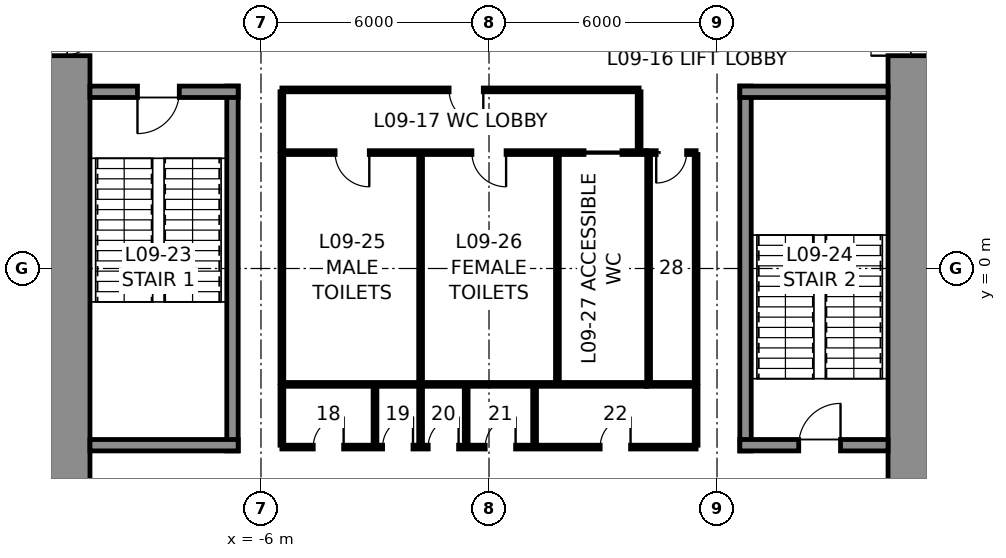
"""IFC4 building model, lengths in metres.
Left out: names, types, materials, properties, quantities, classifications, styles, units other than length and angle.
Written with IfcOpenShell. Run it as: python <this file> out.ifc"""

import sys

from ifc_helpers import new_model, si_unit, direction, frame, frame_2d, origin, place, context, subcontext, project, spatial, rectangle, extrude, element, fill, save


model = new_model("IFC4")
c1 = context("Model", 3, precision=1e-05, world=origin(), true_north=direction((0.0, 1.0)))
c2 = subcontext(c1, "Body", "Model", "MODEL_VIEW")
j1 = project(units=[si_unit("LENGTHUNIT", "METRE"), si_unit("PLANEANGLEUNIT", "RADIAN")], contexts=[c1])
p1 = place(None, origin())
s1 = spatial("IfcSite", under=j1, at=p1, CompositionType="ELEMENT")
p2 = place(p1, origin())
s2 = spatial("IfcBuilding", under=s1, at=p2, CompositionType="ELEMENT")
p3 = place(p2, frame((0.0, 0.0, 48.5)))
s3 = spatial("IfcBuildingStorey", under=s2, at=p3, CompositionType="ELEMENT", Elevation=48.5)
p4 = place(p3, frame((11.25, 10.5, 0.0), z_axis=(0.0, 0.0, 1.0), x_axis=(0.0, -1.0, 0.0)))
e1 = element("IfcWall", 1, at=p4, inside=s3, PredefinedType="SHEAR", context=c2, shape_type="SweptSolid", body=[
    extrude(rectangle(XDim=21.0, YDim=1.5, at=frame_2d((10.5, 0.0))), origin(), (0.0, 0.0, 1.0), 5.5),
])
p5 = place(p4, frame((3.7, 0.0, 0.0)))
e2 = element("IfcOpeningElement", 2, at=p5, cuts=e1, PredefinedType="OPENING", context=c2, shape_type="SweptSolid", body=[
    extrude(rectangle(XDim=1.2, YDim=2.3, at=frame_2d((0.6, 1.15))), frame((0.0, 0.76, 0.0), z_axis=(0.0, -1.0, 0.0), x_axis=(1.0, 0.0, 0.0)), (0.0, 0.0, 1.0), 1.52),
])
p6 = place(p4, frame((16.1, 0.0, 0.0)))
e3 = element("IfcOpeningElement", 3, at=p6, cuts=e1, PredefinedType="OPENING", context=c2, shape_type="SweptSolid", body=[
    extrude(rectangle(XDim=1.2, YDim=2.3, at=frame_2d((0.6, 1.15))), frame((0.0, 0.76, 0.0), z_axis=(0.0, -1.0, 0.0), x_axis=(1.0, 0.0, 0.0)), (0.0, 0.0, 1.0), 1.52),
])
p7 = place(p3, frame((-11.25, -10.5, 0.0), z_axis=(0.0, 0.0, 1.0), x_axis=(0.0, 1.0, 0.0)))
e4 = element("IfcWall", 4, at=p7, inside=s3, PredefinedType="SHEAR", context=c2, shape_type="SweptSolid", body=[
    extrude(rectangle(XDim=21.0, YDim=1.5, at=frame_2d((10.5, 0.0))), origin(), (0.0, 0.0, 1.0), 5.5),
])
p8 = place(p7, frame((16.1, 0.0, 0.0)))
e5 = element("IfcOpeningElement", 5, at=p8, cuts=e4, PredefinedType="OPENING", context=c2, shape_type="SweptSolid", body=[
    extrude(rectangle(XDim=1.2, YDim=2.3, at=frame_2d((0.6, 1.15))), frame((0.0, 0.76, 0.0), z_axis=(0.0, -1.0, 0.0), x_axis=(1.0, 0.0, 0.0)), (0.0, 0.0, 1.0), 1.52),
])
p9 = place(p7, frame((3.7, 0.0, 0.0)))
e6 = element("IfcOpeningElement", 6, at=p9, cuts=e4, PredefinedType="OPENING", context=c2, shape_type="SweptSolid", body=[
    extrude(rectangle(XDim=1.2, YDim=2.3, at=frame_2d((0.6, 1.15))), frame((0.0, 0.76, 0.0), z_axis=(0.0, -1.0, 0.0), x_axis=(1.0, 0.0, 0.0)), (0.0, 0.0, 1.0), 1.52),
])
p10 = place(p3, frame((-6.75, -4.8, 0.0), z_axis=(0.0, 0.0, 1.0), x_axis=(0.0, 1.0, 0.0)))
e7 = element("IfcWall", 7, at=p10, inside=s3, PredefinedType="SOLIDWALL", context=c2, shape_type="SweptSolid", body=[
    extrude(rectangle(XDim=9.6, YDim=0.3, at=frame_2d((4.8, 0.0))), origin(), (0.0, 0.0, 1.0), 5.25),
])
p11 = place(p3, frame((-10.5, 4.65, 0.0), z_axis=(0.0, 0.0, 1.0), x_axis=(1.0, 0.0, 0.0)))
e8 = element("IfcWall", 8, at=p11, inside=s3, PredefinedType="SOLIDWALL", context=c2, shape_type="SweptSolid", body=[
    extrude(rectangle(XDim=3.9, YDim=0.3, at=frame_2d((1.95, 0.0))), origin(), (0.0, 0.0, 1.0), 5.25),
])
p12 = place(p11, frame((1.25, 0.0, 0.0)))
e9 = element("IfcOpeningElement", 9, at=p12, cuts=e8, PredefinedType="OPENING", context=c2, shape_type="SweptSolid", body=[
    extrude(rectangle(XDim=1.1, YDim=2.3, at=frame_2d((0.55, 1.15))), frame((0.0, 0.16, 0.0), z_axis=(0.0, -1.0, 0.0), x_axis=(1.0, 0.0, 0.0)), (0.0, 0.0, 1.0), 0.32),
])
p13 = place(p3, frame((-6.6, -4.65, 0.0), z_axis=(0.0, 0.0, 1.0), x_axis=(-1.0, 0.0, 0.0)))
e10 = element("IfcWall", 10, at=p13, inside=s3, PredefinedType="SOLIDWALL", context=c2, shape_type="SweptSolid", body=[
    extrude(rectangle(XDim=3.9, YDim=0.3, at=frame_2d((1.95, 0.0))), origin(), (0.0, 0.0, 1.0), 5.25),
])
p14 = place(p3, frame((6.75, -4.8, 0.0), z_axis=(0.0, 0.0, 1.0), x_axis=(0.0, 1.0, 0.0)))
e11 = element("IfcWall", 11, at=p14, inside=s3, PredefinedType="SOLIDWALL", context=c2, shape_type="SweptSolid", body=[
    extrude(rectangle(XDim=9.6, YDim=0.3, at=frame_2d((4.8, 0.0))), origin(), (0.0, 0.0, 1.0), 5.25),
])
p15 = place(p3, frame((6.6, 4.65, 0.0), z_axis=(0.0, 0.0, 1.0), x_axis=(1.0, 0.0, 0.0)))
e12 = element("IfcWall", 12, at=p15, inside=s3, PredefinedType="SOLIDWALL", context=c2, shape_type="SweptSolid", body=[
    extrude(rectangle(XDim=3.9, YDim=0.3, at=frame_2d((1.95, 0.0))), origin(), (0.0, 0.0, 1.0), 5.25),
])
p16 = place(p3, frame((10.5, -4.65, 0.0), z_axis=(0.0, 0.0, 1.0), x_axis=(-1.0, 0.0, 0.0)))
e13 = element("IfcWall", 13, at=p16, inside=s3, PredefinedType="SOLIDWALL", context=c2, shape_type="SweptSolid", body=[
    extrude(rectangle(XDim=3.9, YDim=0.3, at=frame_2d((1.95, 0.0))), origin(), (0.0, 0.0, 1.0), 5.25),
])
p17 = place(p16, frame((1.25, 0.0, 0.0)))
e14 = element("IfcOpeningElement", 14, at=p17, cuts=e13, PredefinedType="OPENING", context=c2, shape_type="SweptSolid", body=[
    extrude(rectangle(XDim=1.1, YDim=2.3, at=frame_2d((0.55, 1.15))), frame((0.0, 0.16, 0.0), z_axis=(0.0, -1.0, 0.0), x_axis=(1.0, 0.0, 0.0)), (0.0, 0.0, 1.0), 0.32),
])
p18 = place(p3, frame((-5.45, 3.05, 0.0), z_axis=(0.0, 0.0, 1.0), x_axis=(1.0, 0.0, 0.0)))
e15 = element("IfcWall", 15, at=p18, inside=s3, PredefinedType="PARTITIONING", context=c2, shape_type="SweptSolid", body=[
    extrude(rectangle(XDim=9.6, YDim=0.1, at=frame_2d((4.8, 0.0))), origin(), (0.0, 0.0, 1.0), 5.25),
])
p19 = place(p18, frame((1.4, 0.0, 0.0)))
e16 = element("IfcOpeningElement", 16, at=p19, cuts=e15, PredefinedType="OPENING", context=c2, shape_type="SweptSolid", body=[
    extrude(rectangle(XDim=0.9, YDim=2.3, at=frame_2d((0.45, 1.15))), frame((0.0, 0.06, 0.0), z_axis=(0.0, -1.0, 0.0), x_axis=(1.0, 0.0, 0.0)), (0.0, 0.0, 1.0), 0.12),
])
p20 = place(p18, frame((5.0, 0.0, 0.0)))
e17 = element("IfcOpeningElement", 17, at=p20, cuts=e15, PredefinedType="OPENING", context=c2, shape_type="SweptSolid", body=[
    extrude(rectangle(XDim=0.9, YDim=2.3, at=frame_2d((0.45, 1.15))), frame((0.0, 0.06, 0.0), z_axis=(0.0, -1.0, 0.0), x_axis=(1.0, 0.0, 0.0)), (0.0, 0.0, 1.0), 0.12),
])
p21 = place(p18, frame((7.95, 0.0, 0.0)))
e18 = element("IfcOpeningElement", 18, at=p21, cuts=e15, PredefinedType="OPENING", context=c2, shape_type="SweptSolid", body=[
    extrude(rectangle(XDim=1.0, YDim=2.3, at=frame_2d((0.5, 1.15))), frame((0.0, 0.06, 0.0), z_axis=(0.0, -1.0, 0.0), x_axis=(1.0, 0.0, 0.0)), (0.0, 0.0, 1.0), 0.12),
])
p22 = place(p3, frame((4.15, 3.05, 0.0), z_axis=(0.0, 0.0, 1.0), x_axis=(1.0, 0.0, 0.0)))
e19 = element("IfcWall", 19, at=p22, inside=s3, PredefinedType="PARTITIONING", context=c2, shape_type="SweptSolid", body=[
    extrude(rectangle(XDim=1.3, YDim=0.1, at=frame_2d((0.65, 0.0))), origin(), (0.0, 0.0, 1.0), 5.25),
])
p23 = place(p22, frame((0.25, 0.0, 0.0)))
e20 = element("IfcOpeningElement", 20, at=p23, cuts=e19, PredefinedType="OPENING", context=c2, shape_type="SweptSolid", body=[
    extrude(rectangle(XDim=0.8, YDim=2.3, at=frame_2d((0.4, 1.15))), frame((0.0, 0.06, 0.0), z_axis=(0.0, -1.0, 0.0), x_axis=(1.0, 0.0, 0.0)), (0.0, 0.0, 1.0), 0.12),
])
p24 = place(p3, frame((4.15, -3.05, 0.0), z_axis=(0.0, 0.0, 1.0), x_axis=(-1.0, 0.0, 0.0)))
e21 = element("IfcWall", 21, at=p24, inside=s3, PredefinedType="PARTITIONING", context=c2, shape_type="SweptSolid", body=[
    extrude(rectangle(XDim=9.6, YDim=0.1, at=frame_2d((4.8, 0.0))), origin(), (0.0, 0.0, 1.0), 5.25),
])
p25 = place(p3, frame((5.45, -3.05, 0.0), z_axis=(0.0, 0.0, 1.0), x_axis=(-1.0, 0.0, 0.0)))
e22 = element("IfcWall", 22, at=p25, inside=s3, PredefinedType="PARTITIONING", context=c2, shape_type="SweptSolid", body=[
    extrude(rectangle(XDim=1.3, YDim=0.1, at=frame_2d((0.65, 0.0))), origin(), (0.0, 0.0, 1.0), 5.25),
])
for number, where, z_axis, x_axis in (
    (23, (5.45, 3.0, 0.0), (0.0, 0.0, 1.0), (0.0, -1.0, 0.0)),
    (24, (-5.45, -3.0, 0.0), (0.0, 0.0, 1.0), (0.0, 1.0, 0.0)),
    (25, (-1.8, -3.0, 0.0), (0.0, 0.0, 1.0), (0.0, 1.0, 0.0)),
    (26, (1.8, -3.0, 0.0), (0.0, 0.0, 1.0), (0.0, 1.0, 0.0)),
    (27, (4.2, -3.0, 0.0), (0.0, 0.0, 1.0), (0.0, 1.0, 0.0)),
):
    element("IfcWall", number, at=place(p3, frame(where, z_axis=z_axis, x_axis=x_axis)), inside=s3, PredefinedType="PARTITIONING", context=c2, shape_type="SweptSolid", body=[
        extrude(rectangle(XDim=6.0, YDim=0.1, at=frame_2d((3.0, 0.0))), origin(), (0.0, 0.0, 1.0), 5.25),
    ])
p26 = place(p3, frame((-5.45, 4.7, 0.0), z_axis=(0.0, 0.0, 1.0), x_axis=(1.0, 0.0, 0.0)))
e28 = element("IfcWall", 28, at=p26, inside=s3, PredefinedType="PARTITIONING", context=c2, shape_type="SweptSolid", body=[
    extrude(rectangle(XDim=9.4, YDim=0.1, at=frame_2d((4.7, 0.0))), origin(), (0.0, 0.0, 1.0), 5.25),
])
p27 = place(p26, frame((4.4, 0.0, 0.0)))
e29 = element("IfcOpeningElement", 29, at=p27, cuts=e28, PredefinedType="OPENING", context=c2, shape_type="SweptSolid", body=[
    extrude(rectangle(XDim=0.9, YDim=2.3, at=frame_2d((0.45, 1.15))), frame((0.0, 0.06, 0.0), z_axis=(0.0, -1.0, 0.0), x_axis=(1.0, 0.0, 0.0)), (0.0, 0.0, 1.0), 0.12),
])
for number, where, z_axis, x_axis in (
    (30, (-5.45, 3.1, 0.0), (0.0, 0.0, 1.0), (0.0, 1.0, 0.0)),
    (31, (3.95, 3.1, 0.0), (0.0, 0.0, 1.0), (0.0, 1.0, 0.0)),
):
    element("IfcWall", number, at=place(p3, frame(where, z_axis=z_axis, x_axis=x_axis)), inside=s3, PredefinedType="PARTITIONING", context=c2, shape_type="SweptSolid", body=[
        extrude(rectangle(XDim=1.55, YDim=0.1, at=frame_2d((0.775, 0.0))), origin(), (0.0, 0.0, 1.0), 5.25),
    ])
p28 = place(p3, frame((5.45, -4.7, 0.0), z_axis=(0.0, 0.0, 1.0), x_axis=(-1.0, 0.0, 0.0)))
e32 = element("IfcWall", 32, at=p28, inside=s3, PredefinedType="PARTITIONING", context=c2, shape_type="SweptSolid", body=[
    extrude(rectangle(XDim=10.9, YDim=0.1, at=frame_2d((5.45, 0.0))), origin(), (0.0, 0.0, 1.0), 5.25),
])
p29 = place(p28, frame((9.275, 0.0, 0.0)))
e33 = element("IfcOpeningElement", 33, at=p29, cuts=e32, PredefinedType="OPENING", context=c2, shape_type="SweptSolid", body=[
    extrude(rectangle(XDim=0.8, YDim=2.3, at=frame_2d((0.4, 1.15))), frame((0.0, 0.06, 0.0), z_axis=(0.0, -1.0, 0.0), x_axis=(1.0, 0.0, 0.0)), (0.0, 0.0, 1.0), 0.12),
])
p30 = place(p28, frame((7.45, 0.0, 0.0)))
e34 = element("IfcOpeningElement", 34, at=p30, cuts=e32, PredefinedType="OPENING", context=c2, shape_type="SweptSolid", body=[
    extrude(rectangle(XDim=0.8, YDim=2.3, at=frame_2d((0.4, 1.15))), frame((0.0, 0.06, 0.0), z_axis=(0.0, -1.0, 0.0), x_axis=(1.0, 0.0, 0.0)), (0.0, 0.0, 1.0), 0.12),
])
p31 = place(p28, frame((6.25, 0.0, 0.0)))
e35 = element("IfcOpeningElement", 35, at=p31, cuts=e32, PredefinedType="OPENING", context=c2, shape_type="SweptSolid", body=[
    extrude(rectangle(XDim=0.8, YDim=2.3, at=frame_2d((0.4, 1.15))), frame((0.0, 0.06, 0.0), z_axis=(0.0, -1.0, 0.0), x_axis=(1.0, 0.0, 0.0)), (0.0, 0.0, 1.0), 0.12),
])
p32 = place(p28, frame((4.75, 0.0, 0.0)))
e36 = element("IfcOpeningElement", 36, at=p32, cuts=e32, PredefinedType="OPENING", context=c2, shape_type="SweptSolid", body=[
    extrude(rectangle(XDim=0.8, YDim=2.3, at=frame_2d((0.4, 1.15))), frame((0.0, 0.06, 0.0), z_axis=(0.0, -1.0, 0.0), x_axis=(1.0, 0.0, 0.0)), (0.0, 0.0, 1.0), 0.12),
])
p33 = place(p28, frame((1.725, 0.0, 0.0)))
e37 = element("IfcOpeningElement", 37, at=p33, cuts=e32, PredefinedType="OPENING", context=c2, shape_type="SweptSolid", body=[
    extrude(rectangle(XDim=0.8, YDim=2.3, at=frame_2d((0.4, 1.15))), frame((0.0, 0.06, 0.0), z_axis=(0.0, -1.0, 0.0), x_axis=(1.0, 0.0, 0.0)), (0.0, 0.0, 1.0), 0.12),
])
for number, where, z_axis, x_axis in (
    (38, (-5.45, -3.1, 0.0), (0.0, 0.0, 1.0), (0.0, -1.0, 0.0)),
    (39, (5.45, -3.1, 0.0), (0.0, 0.0, 1.0), (0.0, -1.0, 0.0)),
    (40, (-3.0, -3.1, 0.0), (0.0, 0.0, 1.0), (0.0, -1.0, 0.0)),
    (41, (-1.8, -3.1, 0.0), (0.0, 0.0, 1.0), (0.0, -1.0, 0.0)),
    (42, (-0.6, -3.1, 0.0), (0.0, 0.0, 1.0), (0.0, -1.0, 0.0)),
    (43, (1.2, -3.1, 0.0), (0.0, 0.0, 1.0), (0.0, -1.0, 0.0)),
):
    element("IfcWall", number, at=place(p3, frame(where, z_axis=z_axis, x_axis=x_axis)), inside=s3, PredefinedType="PARTITIONING", context=c2, shape_type="SweptSolid", body=[
        extrude(rectangle(XDim=1.55, YDim=0.1, at=frame_2d((0.775, 0.0))), origin(), (0.0, 0.0, 1.0), 5.25),
    ])
p34 = place(p12, frame((1.1, 0.0, 0.0), z_axis=(0.0, 0.0, 1.0), x_axis=(-1.0, 0.0, 0.0)))
e44 = element("IfcDoor", 44, at=p34, inside=s3, OperationType="SINGLE_SWING_RIGHT", PredefinedType="DOOR", context=c2, shape_type="SweptSolid", body=[
    extrude(rectangle(XDim=1.1, YDim=2.3, at=frame_2d((0.55, 1.15))), frame((0.0, 0.025, 0.0), z_axis=(0.0, -1.0, 0.0), x_axis=(1.0, 0.0, 0.0)), (0.0, 0.0, 1.0), 0.05),
])
fill(e9, e44)
p35 = place(p17, frame((1.1, 0.0, 0.0), z_axis=(0.0, 0.0, 1.0), x_axis=(-1.0, 0.0, 0.0)))
e45 = element("IfcDoor", 45, at=p35, inside=s3, OperationType="SINGLE_SWING_RIGHT", PredefinedType="DOOR", context=c2, shape_type="SweptSolid", body=[
    extrude(rectangle(XDim=1.1, YDim=2.3, at=frame_2d((0.55, 1.15))), frame((0.0, 0.025, 0.0), z_axis=(0.0, -1.0, 0.0), x_axis=(1.0, 0.0, 0.0)), (0.0, 0.0, 1.0), 0.05),
])
fill(e14, e45)
p36 = place(p19, frame((0.9, 0.0, 0.0), z_axis=(0.0, 0.0, 1.0), x_axis=(-1.0, 0.0, 0.0)))
e46 = element("IfcDoor", 46, at=p36, inside=s3, OperationType="SINGLE_SWING_LEFT", PredefinedType="DOOR", context=c2, shape_type="SweptSolid", body=[
    extrude(rectangle(XDim=0.9, YDim=2.3, at=frame_2d((0.45, 1.15))), frame((0.0, 0.025, 0.0), z_axis=(0.0, -1.0, 0.0), x_axis=(1.0, 0.0, 0.0)), (0.0, 0.0, 1.0), 0.05),
])
fill(e16, e46)
p37 = place(p20, frame((0.9, 0.0, 0.0), z_axis=(0.0, 0.0, 1.0), x_axis=(-1.0, 0.0, 0.0)))
e47 = element("IfcDoor", 47, at=p37, inside=s3, OperationType="SINGLE_SWING_LEFT", PredefinedType="DOOR", context=c2, shape_type="SweptSolid", body=[
    extrude(rectangle(XDim=0.9, YDim=2.3, at=frame_2d((0.45, 1.15))), frame((0.0, 0.025, 0.0), z_axis=(0.0, -1.0, 0.0), x_axis=(1.0, 0.0, 0.0)), (0.0, 0.0, 1.0), 0.05),
])
fill(e17, e47)
p38 = place(p21, frame((1.0, 0.0, 0.0), z_axis=(0.0, 0.0, 1.0), x_axis=(-1.0, 0.0, 0.0)))
e48 = element("IfcDoor", 48, at=p38, inside=s3, OperationType="SLIDING_TO_LEFT", PredefinedType="DOOR", context=c2, shape_type="SweptSolid", body=[
    extrude(rectangle(XDim=1.0, YDim=2.3, at=frame_2d((0.5, 1.15))), frame((0.0, 0.025, 0.0), z_axis=(0.0, -1.0, 0.0), x_axis=(1.0, 0.0, 0.0)), (0.0, 0.0, 1.0), 0.05),
])
fill(e18, e48)
p39 = place(p23, frame((0.8, 0.0, 0.0), z_axis=(0.0, 0.0, 1.0), x_axis=(-1.0, 0.0, 0.0)))
e49 = element("IfcDoor", 49, at=p39, inside=s3, OperationType="SINGLE_SWING_RIGHT", PredefinedType="DOOR", context=c2, shape_type="SweptSolid", body=[
    extrude(rectangle(XDim=0.8, YDim=2.3, at=frame_2d((0.4, 1.15))), frame((0.0, 0.025, 0.0), z_axis=(0.0, -1.0, 0.0), x_axis=(1.0, 0.0, 0.0)), (0.0, 0.0, 1.0), 0.05),
])
fill(e20, e49)
p40 = place(p27, frame((0.9, 0.0, 0.0), z_axis=(0.0, 0.0, 1.0), x_axis=(-1.0, 0.0, 0.0)))
e50 = element("IfcDoor", 50, at=p40, inside=s3, OperationType="SINGLE_SWING_LEFT", PredefinedType="DOOR", context=c2, shape_type="SweptSolid", body=[
    extrude(rectangle(XDim=0.9, YDim=2.3, at=frame_2d((0.45, 1.15))), frame((0.0, 0.025, 0.0), z_axis=(0.0, -1.0, 0.0), x_axis=(1.0, 0.0, 0.0)), (0.0, 0.0, 1.0), 0.05),
])
fill(e29, e50)
p41 = place(p29, frame((0.8, 0.0, 0.0), z_axis=(0.0, 0.0, 1.0), x_axis=(-1.0, 0.0, 0.0)))
e51 = element("IfcDoor", 51, at=p41, inside=s3, OperationType="SINGLE_SWING_RIGHT", PredefinedType="DOOR", context=c2, shape_type="SweptSolid", body=[
    extrude(rectangle(XDim=0.8, YDim=2.3, at=frame_2d((0.4, 1.15))), frame((0.0, 0.025, 0.0), z_axis=(0.0, -1.0, 0.0), x_axis=(1.0, 0.0, 0.0)), (0.0, 0.0, 1.0), 0.05),
])
fill(e33, e51)
p42 = place(p30, frame((0.8, 0.0, 0.0), z_axis=(0.0, 0.0, 1.0), x_axis=(-1.0, 0.0, 0.0)))
e52 = element("IfcDoor", 52, at=p42, inside=s3, OperationType="SINGLE_SWING_RIGHT", PredefinedType="DOOR", context=c2, shape_type="SweptSolid", body=[
    extrude(rectangle(XDim=0.8, YDim=2.3, at=frame_2d((0.4, 1.15))), frame((0.0, 0.025, 0.0), z_axis=(0.0, -1.0, 0.0), x_axis=(1.0, 0.0, 0.0)), (0.0, 0.0, 1.0), 0.05),
])
fill(e34, e52)
p43 = place(p31, frame((0.8, 0.0, 0.0), z_axis=(0.0, 0.0, 1.0), x_axis=(-1.0, 0.0, 0.0)))
e53 = element("IfcDoor", 53, at=p43, inside=s3, OperationType="SINGLE_SWING_RIGHT", PredefinedType="DOOR", context=c2, shape_type="SweptSolid", body=[
    extrude(rectangle(XDim=0.8, YDim=2.3, at=frame_2d((0.4, 1.15))), frame((0.0, 0.025, 0.0), z_axis=(0.0, -1.0, 0.0), x_axis=(1.0, 0.0, 0.0)), (0.0, 0.0, 1.0), 0.05),
])
fill(e35, e53)
p44 = place(p32, frame((0.8, 0.0, 0.0), z_axis=(0.0, 0.0, 1.0), x_axis=(-1.0, 0.0, 0.0)))
e54 = element("IfcDoor", 54, at=p44, inside=s3, OperationType="SINGLE_SWING_RIGHT", PredefinedType="DOOR", context=c2, shape_type="SweptSolid", body=[
    extrude(rectangle(XDim=0.8, YDim=2.3, at=frame_2d((0.4, 1.15))), frame((0.0, 0.025, 0.0), z_axis=(0.0, -1.0, 0.0), x_axis=(1.0, 0.0, 0.0)), (0.0, 0.0, 1.0), 0.05),
])
fill(e36, e54)
p45 = place(p33, frame((0.8, 0.0, 0.0), z_axis=(0.0, 0.0, 1.0), x_axis=(-1.0, 0.0, 0.0)))
e55 = element("IfcDoor", 55, at=p45, inside=s3, OperationType="SINGLE_SWING_RIGHT", PredefinedType="DOOR", context=c2, shape_type="SweptSolid", body=[
    extrude(rectangle(XDim=0.8, YDim=2.3, at=frame_2d((0.4, 1.15))), frame((0.0, 0.025, 0.0), z_axis=(0.0, -1.0, 0.0), x_axis=(1.0, 0.0, 0.0)), (0.0, 0.0, 1.0), 0.05),
])
fill(e37, e55)
p46 = place(p8, frame((1.2, 0.0, 0.0), z_axis=(0.0, 0.0, 1.0), x_axis=(-1.0, 0.0, 0.0)))
e56 = element("IfcDoor", 56, at=p46, inside=s3, OperationType="SINGLE_SWING_LEFT", PredefinedType="DOOR", context=c2, shape_type="SweptSolid", body=[
    extrude(rectangle(XDim=1.2, YDim=2.3, at=frame_2d((0.6, 1.15))), frame((0.0, 0.025, 0.0), z_axis=(0.0, -1.0, 0.0), x_axis=(1.0, 0.0, 0.0)), (0.0, 0.0, 1.0), 0.05),
])
fill(e5, e56)
p47 = place(p5, frame((1.2, 0.0, 0.0), z_axis=(0.0, 0.0, 1.0), x_axis=(-1.0, 0.0, 0.0)))
e57 = element("IfcDoor", 57, at=p47, inside=s3, OperationType="SINGLE_SWING_LEFT", PredefinedType="DOOR", context=c2, shape_type="SweptSolid", body=[
    extrude(rectangle(XDim=1.2, YDim=2.3, at=frame_2d((0.6, 1.15))), frame((0.0, 0.025, 0.0), z_axis=(0.0, -1.0, 0.0), x_axis=(1.0, 0.0, 0.0)), (0.0, 0.0, 1.0), 0.05),
])
fill(e2, e57)
save(model, sys.argv[1])
